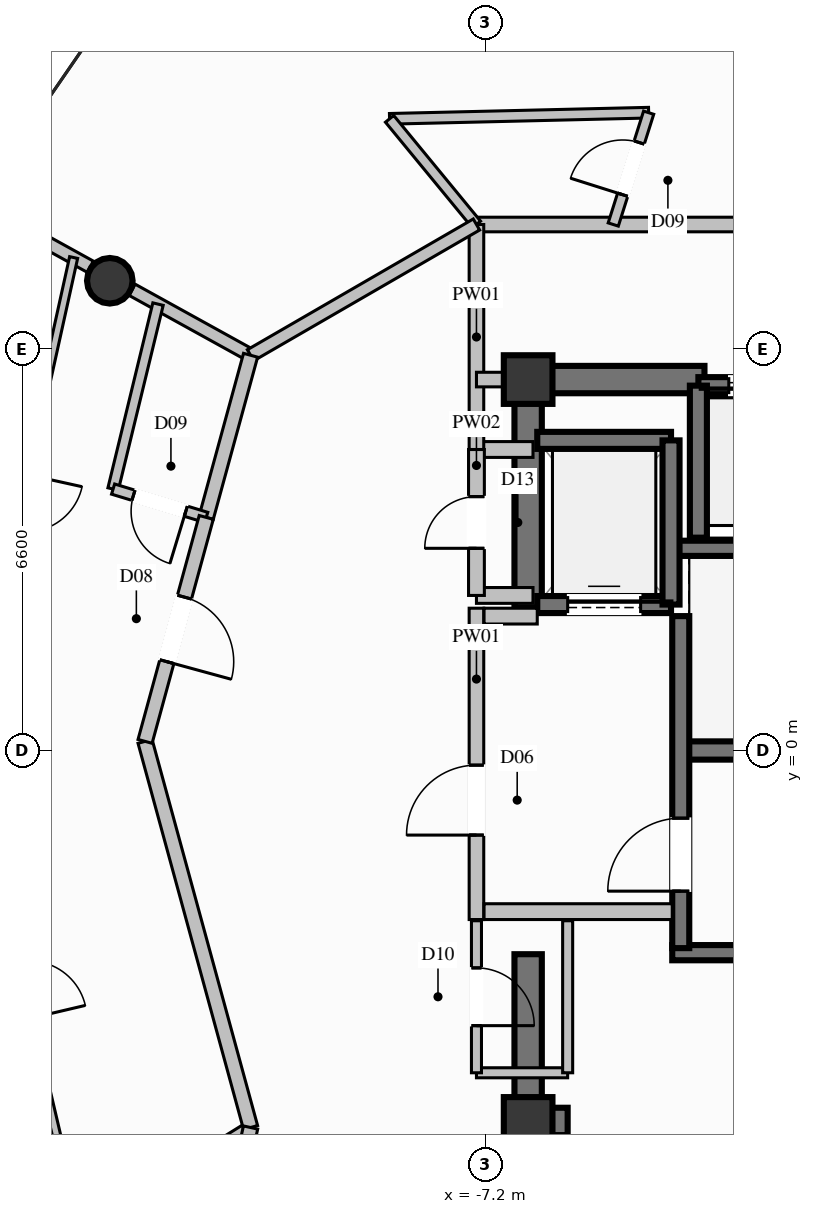
"""IFC4 building model, lengths in metres.
Left out: names, types, materials, properties, quantities, classifications, styles, units other than length and angle.
Written with IfcOpenShell. Run it as: python <this file> out.ifc"""

import sys

from ifc_helpers import new_model, si_unit, direction, frame, frame_2d, origin, origin_2d, place, context, subcontext, project, spatial, rectangle, circle, extrude, element, fill, save


model = new_model("IFC4")
c1 = context("Model", 3, precision=1e-05, world=origin(), true_north=direction((0.0, 1.0)))
c2 = subcontext(c1, "Body", "Model", "MODEL_VIEW")
j1 = project(units=[si_unit("LENGTHUNIT", "METRE"), si_unit("PLANEANGLEUNIT", "RADIAN")], contexts=[c1])
p1 = place(None, origin())
s1 = spatial("IfcSite", under=j1, at=p1, CompositionType="ELEMENT")
p2 = place(p1, origin())
s2 = spatial("IfcBuilding", under=s1, at=p2, CompositionType="ELEMENT")
p3 = place(p2, frame((0.0, 0.0, 250.6)))
s3 = spatial("IfcBuildingStorey", under=s2, at=p3, CompositionType="ELEMENT", Elevation=250.6)
for number, where, z_axis, x_axis in (
    (1, (-6.5, -6.1, 0.0), (0.0, 0.0, 1.0), (1.0, 0.0, 0.0)),
    (2, (-6.5, 6.1, 0.0), (0.0, 0.0, 1.0), (1.0, 0.0, 0.0)),
):
    element("IfcColumn", number, at=place(p3, frame(where, z_axis=z_axis, x_axis=x_axis)), inside=s3, PredefinedType="COLUMN", context=c2, shape_type="SweptSolid", body=[
        extrude(rectangle(XDim=0.8, YDim=0.8, at=origin_2d()), origin(), (0.0, 0.0, 1.0), 3.8),
    ])
p4 = place(p3, frame((-3.99, 0.0, 0.0), z_axis=(0.0, 0.0, 1.0), x_axis=(1.0, 0.0, 0.0)))
e3 = element("IfcWall", 3, at=p4, inside=s3, PredefinedType="SHEAR", context=c2, shape_type="SweptSolid", body=[
    extrude(rectangle(XDim=7.98, YDim=0.3, at=frame_2d((3.99, 0.0))), origin(), (0.0, 0.0, 1.0), 3.8),
])
for number, where, z_axis, x_axis in (
    (4, (-4.13, -3.325, 0.0), (0.0, 0.0, 1.0), (1.0, 0.0, 0.0)),
    (5, (-4.13, 3.325, 0.0), (0.0, 0.0, 1.0), (1.0, 0.0, 0.0)),
):
    element("IfcWall", number, at=place(p3, frame(where, z_axis=z_axis, x_axis=x_axis)), inside=s3, PredefinedType="SOLIDWALL", context=c2, shape_type="SweptSolid", body=[
        extrude(rectangle(XDim=8.26, YDim=0.25, at=frame_2d((4.13, 0.0))), origin(), (0.0, 0.0, 1.0), 3.8),
    ])
p5 = place(p3, frame((-6.275, -6.1, 0.0), z_axis=(0.0, 0.0, 1.0), x_axis=(1.0, 0.0, 0.0)))
e6 = element("IfcWall", 6, at=p5, inside=s3, PredefinedType="SHEAR", context=c2, shape_type="SweptSolid", body=[
    extrude(rectangle(XDim=0.425, YDim=0.45, at=frame_2d((0.212, 0.0))), origin(), (0.0, 0.0, 1.0), 3.8),
])
p6 = place(p3, frame((-6.275, 6.1, 0.0), z_axis=(0.0, 0.0, 1.0), x_axis=(1.0, 0.0, 0.0)))
e7 = element("IfcWall", 7, at=p6, inside=s3, PredefinedType="SHEAR", context=c2, shape_type="SweptSolid", body=[
    extrude(rectangle(XDim=2.675, YDim=0.45, at=frame_2d((1.337, 0.0))), origin(), (0.0, 0.0, 1.0), 3.8),
])
p7 = place(p3, frame((-6.5, 2.35, 0.0), z_axis=(0.0, 0.0, 1.0), x_axis=(0.0, 1.0, 0.0)))
e8 = element("IfcWall", 8, at=p7, inside=s3, PredefinedType="SHEAR", context=c2, shape_type="SweptSolid", body=[
    extrude(rectangle(XDim=3.975, YDim=0.45, at=frame_2d((1.987, 0.0))), origin(), (0.0, 0.0, 1.0), 3.8),
])
p8 = place(p3, frame((-6.5, -6.325, 0.0), z_axis=(0.0, 0.0, 1.0), x_axis=(0.0, 1.0, 0.0)))
e9 = element("IfcWall", 9, at=p8, inside=s3, PredefinedType="SHEAR", context=c2, shape_type="SweptSolid", body=[
    extrude(rectangle(XDim=2.975, YDim=0.45, at=frame_2d((1.487, 0.0))), origin(), (0.0, 0.0, 1.0), 3.8),
])
p9 = place(p3, frame((-13.38, 7.725, 0.0), z_axis=(0.0, 0.0, 1.0), x_axis=(1.0, 0.0, 0.0)))
e10 = element("IfcColumn", 10, at=p9, inside=s3, PredefinedType="COLUMN", context=c2, shape_type="SweptSolid", body=[
    extrude(circle(Radius=0.375, at=origin_2d()), origin(), (0.0, 0.0, 1.0), 3.8),
])
p10 = place(p3, frame((-1.6, 6.0, 0.0), z_axis=(0.0, 0.0, 1.0), x_axis=(-1.0, 0.0, 0.0)))
e11 = element("IfcWall", 11, at=p10, inside=s3, PredefinedType="SOLIDWALL", context=c2, shape_type="SweptSolid", body=[
    extrude(rectangle(XDim=2.1, YDim=0.28, at=frame_2d((1.05, 0.0))), origin(), (0.0, 0.0, 1.0), 3.57),
])
p11 = place(p10, frame((0.5, 0.0, 0.0)))
e12 = element("IfcOpeningElement", 12, at=p11, cuts=e11, PredefinedType="OPENING", context=c2, shape_type="SweptSolid", body=[
    extrude(rectangle(XDim=1.1, YDim=2.2, at=frame_2d((0.55, 1.1))), frame((0.0, 0.15, 0.0), z_axis=(0.0, -1.0, 0.0), x_axis=(1.0, 0.0, 0.0)), (0.0, 0.0, 1.0), 0.3),
])
p12 = place(p3, frame((-3.7, 6.0, 0.0), z_axis=(0.0, 0.0, 1.0), x_axis=(0.0, -1.0, 0.0)))
e13 = element("IfcWall", 13, at=p12, inside=s3, PredefinedType="SOLIDWALL", context=c2, shape_type="SweptSolid", body=[
    extrude(rectangle(XDim=2.5, YDim=0.28, at=frame_2d((1.25, 0.0))), origin(), (0.0, 0.0, 1.0), 3.57),
])
p13 = place(p3, frame((-6.35, 2.4, 0.0), z_axis=(0.0, 0.0, 1.0), x_axis=(1.0, 0.0, 0.0)))
e14 = element("IfcWall", 14, at=p13, inside=s3, PredefinedType="SOLIDWALL", context=c2, shape_type="SweptSolid", body=[
    extrude(rectangle(XDim=2.2, YDim=0.28, at=frame_2d((1.1, 0.0))), origin(), (0.0, 0.0, 1.0), 3.57),
])
p14 = place(p13, frame((0.5, 0.0, 0.0)))
e15 = element("IfcOpeningElement", 15, at=p14, cuts=e14, PredefinedType="OPENING", context=c2, shape_type="SweptSolid", body=[
    extrude(rectangle(XDim=1.2, YDim=2.2, at=frame_2d((0.6, 1.1))), frame((0.0, 0.15, 0.0), z_axis=(0.0, -1.0, 0.0), x_axis=(1.0, 0.0, 0.0)), (0.0, 0.0, 1.0), 0.3),
])
p15 = place(p3, frame((-4.15, 5.1, 0.0), z_axis=(0.0, 0.0, 1.0), x_axis=(-1.0, 0.0, 0.0)))
e16 = element("IfcWall", 16, at=p15, inside=s3, PredefinedType="SOLIDWALL", context=c2, shape_type="SweptSolid", body=[
    extrude(rectangle(XDim=2.2, YDim=0.28, at=frame_2d((1.1, 0.0))), origin(), (0.0, 0.0, 1.0), 3.57),
])
p16 = place(p3, frame((-4.15, 2.4, 0.0), z_axis=(0.0, 0.0, 1.0), x_axis=(0.0, 1.0, 0.0)))
e17 = element("IfcWall", 17, at=p16, inside=s3, PredefinedType="SOLIDWALL", context=c2, shape_type="SweptSolid", body=[
    extrude(rectangle(XDim=2.7, YDim=0.28, at=frame_2d((1.35, 0.0))), origin(), (0.0, 0.0, 1.0), 3.57),
])
p17 = place(p3, frame((-3.99, -3.25, 0.0), z_axis=(0.0, 0.0, 1.0), x_axis=(0.0, 1.0, 0.0)))
e18 = element("IfcWall", 18, at=p17, inside=s3, PredefinedType="SOLIDWALL", context=c2, shape_type="SweptSolid", body=[
    extrude(rectangle(XDim=5.46, YDim=0.28, at=frame_2d((2.73, 0.0))), origin(), (0.0, 0.0, 1.0), 3.57),
])
p18 = place(p17, frame((0.937, 0.0, 0.0)))
e19 = element("IfcOpeningElement", 19, at=p18, cuts=e18, PredefinedType="OPENING", context=c2, shape_type="SweptSolid", body=[
    extrude(rectangle(XDim=1.2, YDim=2.2, at=frame_2d((0.6, 1.1))), frame((0.0, 0.15, 0.0), z_axis=(0.0, -1.0, 0.0), x_axis=(1.0, 0.0, 0.0)), (0.0, 0.0, 1.0), 0.3),
])
p19 = place(p3, frame((-7.35, -2.78, 0.0), z_axis=(0.0, 0.0, 1.0), x_axis=(0.0, 1.0, 0.0)))
e20 = element("IfcWall", 20, at=p19, inside=s3, PredefinedType="PARTITIONING", context=c2, shape_type="SweptSolid", body=[
    extrude(rectangle(XDim=5.12, YDim=0.24, at=frame_2d((2.56, 0.0))), origin(), (0.0, 0.0, 1.0), 2.655),
])
p20 = place(p19, frame((1.389, 0.0, 0.0)))
e21 = element("IfcOpeningElement", 21, at=p20, cuts=e20, PredefinedType="OPENING", context=c2, shape_type="SweptSolid", body=[
    extrude(rectangle(XDim=1.15, YDim=2.2, at=frame_2d((0.575, 1.1))), frame((0.0, 0.13, 0.0), z_axis=(0.0, -1.0, 0.0), x_axis=(1.0, 0.0, 0.0)), (0.0, 0.0, 1.0), 0.26),
])
p21 = place(p3, frame((-7.225, -2.65, 0.0), z_axis=(0.0, 0.0, 1.0), x_axis=(1.0, 0.0, 0.0)))
e22 = element("IfcWall", 22, at=p21, inside=s3, PredefinedType="PARTITIONING", context=c2, shape_type="SweptSolid", body=[
    extrude(rectangle(XDim=3.095, YDim=0.26, at=frame_2d((1.548, 0.0))), origin(), (0.0, 0.0, 1.0), 3.57),
])
p22 = place(p3, frame((-7.225, 2.21, 0.0), z_axis=(0.0, 0.0, 1.0), x_axis=(1.0, 0.0, 0.0)))
e23 = element("IfcWall", 23, at=p22, inside=s3, PredefinedType="PARTITIONING", context=c2, shape_type="SweptSolid", body=[
    extrude(rectangle(XDim=0.875, YDim=0.26, at=frame_2d((0.438, 0.0))), origin(), (0.0, 0.0, 1.0), 3.57),
])
for number, where, z_axis, x_axis in (
    (24, (-7.35, 4.95, 0.0), (0.0, 0.0, 1.0), (1.0, 0.0, 0.0)),
    (25, (-7.35, 2.55, 0.0), (0.0, 0.0, 1.0), (1.0, 0.0, 0.0)),
):
    element("IfcWall", number, at=place(p3, frame(where, z_axis=z_axis, x_axis=x_axis)), inside=s3, PredefinedType="PARTITIONING", context=c2, shape_type="SweptSolid", body=[
        extrude(rectangle(XDim=0.93, YDim=0.26, at=frame_2d((0.465, 0.0))), origin(), (0.0, 0.0, 1.0), 3.57),
    ])
p23 = place(p3, frame((-7.35, 2.55, 0.0), z_axis=(0.0, 0.0, 1.0), x_axis=(0.0, 1.0, 0.0)))
e26 = element("IfcWall", 26, at=p23, inside=s3, PredefinedType="PARTITIONING", context=c2, shape_type="SweptSolid", body=[
    extrude(rectangle(XDim=2.4, YDim=0.26, at=frame_2d((1.2, 0.0))), origin(), (0.0, 0.0, 1.0), 2.655),
])
p24 = place(p23, frame((0.775, 0.0, 0.0)))
e27 = element("IfcOpeningElement", 27, at=p24, cuts=e26, PredefinedType="OPENING", context=c2, shape_type="SweptSolid", body=[
    extrude(rectangle(XDim=0.85, YDim=2.05, at=frame_2d((0.425, 1.025))), frame((0.0, 0.14, 0.0), z_axis=(0.0, -1.0, 0.0), x_axis=(1.0, 0.0, 0.0)), (0.0, 0.0, 1.0), 0.28),
])
p25 = place(p3, frame((-7.35, 8.65, 0.0), z_axis=(0.0, 0.0, 1.0), x_axis=(1.0, 0.0, 0.0)))
e28 = element("IfcWall", 28, at=p25, inside=s3, PredefinedType="PARTITIONING", context=c2, shape_type="SweptSolid", body=[
    extrude(rectangle(XDim=14.7, YDim=0.24, at=frame_2d((7.35, 0.0))), origin(), (0.0, 0.0, 1.0), 3.57),
])
p26 = place(p3, frame((-7.35, 4.95, 0.0), z_axis=(0.0, 0.0, 1.0), x_axis=(0.0, 1.0, 0.0)))
e29 = element("IfcWall", 29, at=p26, inside=s3, PredefinedType="PARTITIONING", context=c2, shape_type="SweptSolid", body=[
    extrude(rectangle(XDim=3.7, YDim=0.24, at=frame_2d((1.85, 0.0))), origin(), (0.0, 0.0, 1.0), 2.655),
])
p27 = place(p3, frame((-7.35, 6.1, 0.0), z_axis=(0.0, 0.0, 1.0), x_axis=(1.0, 0.0, 0.0)))
e30 = element("IfcWall", 30, at=p27, inside=s3, PredefinedType="PARTITIONING", context=c2, shape_type="SweptSolid", body=[
    extrude(rectangle(XDim=0.85, YDim=0.24, at=frame_2d((0.425, 0.0))), origin(), (0.0, 0.0, 1.0), 3.086),
])
p28 = place(p3, frame((-7.35, -5.3, 0.0), z_axis=(0.0, 0.0, 1.0), x_axis=(1.0, 0.0, 0.0)))
e31 = element("IfcWall", 31, at=p28, inside=s3, PredefinedType="PARTITIONING", context=c2, shape_type="SweptSolid", body=[
    extrude(rectangle(XDim=1.5, YDim=0.165, at=frame_2d((0.75, 0.0))), origin(), (0.0, 0.0, 1.0), 2.655),
])
p29 = place(p3, frame((-5.85, -5.3, 0.0), z_axis=(0.0, 0.0, 1.0), x_axis=(0.0, 1.0, 0.0)))
e32 = element("IfcWall", 32, at=p29, inside=s3, PredefinedType="PARTITIONING", context=c2, shape_type="SweptSolid", body=[
    extrude(rectangle(XDim=2.5, YDim=0.165, at=frame_2d((1.25, 0.0))), origin(), (0.0, 0.0, 1.0), 2.655),
])
p30 = place(p3, frame((-7.35, -2.8, 0.0), z_axis=(0.0, 0.0, 1.0), x_axis=(0.0, -1.0, 0.0)))
e33 = element("IfcWall", 33, at=p30, inside=s3, PredefinedType="PARTITIONING", context=c2, shape_type="SweptSolid", body=[
    extrude(rectangle(XDim=2.5, YDim=0.165, at=frame_2d((1.25, 0.0))), origin(), (0.0, 0.0, 1.0), 3.57),
])
p31 = place(p30, frame((0.775, 0.0, 0.0)))
e34 = element("IfcOpeningElement", 34, at=p31, cuts=e33, PredefinedType="OPENING", context=c2, shape_type="SweptSolid", body=[
    extrude(rectangle(XDim=0.95, YDim=2.1, at=frame_2d((0.475, 1.05))), frame((0.0, 0.093, 0.0), z_axis=(0.0, -1.0, 0.0), x_axis=(1.0, 0.0, 0.0)), (0.0, 0.0, 1.0), 0.185),
])
p32 = place(p3, frame((-11.065, 6.5, 0.0), z_axis=(0.0, 0.0, 1.0), x_axis=(-0.875272070591, 0.483630853486, 0.0)))
e35 = element("IfcWall", 35, at=p32, inside=s3, PredefinedType="PARTITIONING", context=c2, shape_type="SweptSolid", body=[
    extrude(rectangle(XDim=2.227, YDim=0.21, at=frame_2d((1.113, 0.0))), origin(), (0.0, 0.0, 1.0), 3.086),
])
p33 = place(p3, frame((-13.701, 7.956, 0.0), z_axis=(0.0, 0.0, 1.0), x_axis=(-0.875359190626, 0.483473150637, 0.0)))
e36 = element("IfcWall", 36, at=p33, inside=s3, PredefinedType="PARTITIONING", context=c2, shape_type="SweptSolid", body=[
    extrude(rectangle(XDim=2.103, YDim=0.21, at=frame_2d((1.052, 0.0))), origin(), (0.0, 0.0, 1.0), 3.57),
])
p34 = place(p3, frame((-11.065, -6.2, 0.0), z_axis=(0.0, 0.0, 1.0), x_axis=(-0.84962275773, -0.527390907722, 0.0)))
e37 = element("IfcWall", 37, at=p34, inside=s3, PredefinedType="PARTITIONING", context=c2, shape_type="SweptSolid", body=[
    extrude(rectangle(XDim=2.384, YDim=0.21, at=frame_2d((1.192, 0.0))), origin(), (0.0, 0.0, 1.0), 3.086),
])
p35 = place(p3, frame((-8.779, 10.388, 0.0), z_axis=(0.0, 0.0, 1.0), x_axis=(0.999718779303, 0.02371417949, 0.0)))
e38 = element("IfcWall", 38, at=p35, inside=s3, PredefinedType="PLUMBINGWALL", context=c2, shape_type="SweptSolid", body=[
    extrude(rectangle(XDim=4.262, YDim=0.175, at=frame_2d((2.131, 0.0))), origin(), (0.0, 0.0, 1.0), 3.252),
])
p36 = place(p3, frame((-8.779, 10.388, 0.0), z_axis=(0.0, 0.0, 1.0), x_axis=(0.635079503828, -0.772446777337, 0.0)))
e39 = element("IfcWall", 39, at=p36, inside=s3, PredefinedType="PLUMBINGWALL", context=c2, shape_type="SweptSolid", body=[
    extrude(rectangle(XDim=2.25, YDim=0.175, at=frame_2d((1.125, 0.0))), origin(), (0.0, 0.0, 1.0), 3.57),
])
p37 = place(p3, frame((-5.1, 8.65, 0.0), z_axis=(0.0, 0.0, 1.0), x_axis=(0.301724909856, 0.953395027663, 0.0)))
e40 = element("IfcWall", 40, at=p37, inside=s3, PredefinedType="PLUMBINGWALL", context=c2, shape_type="SweptSolid", body=[
    extrude(rectangle(XDim=1.929, YDim=0.175, at=frame_2d((0.964, 0.0))), origin(), (0.0, 0.0, 1.0), 3.57),
])
p38 = place(p37, frame((0.514, 0.0, 0.0)))
e41 = element("IfcOpeningElement", 41, at=p38, cuts=e40, PredefinedType="OPENING", context=c2, shape_type="SweptSolid", body=[
    extrude(rectangle(XDim=0.9, YDim=2.1, at=frame_2d((0.45, 1.05))), frame((0.0, 0.098, 0.0), z_axis=(0.0, -1.0, 0.0), x_axis=(1.0, 0.0, 0.0)), (0.0, 0.0, 1.0), 0.195),
])
p39 = place(p3, frame((-11.065, 6.5, 0.0), z_axis=(0.0, 0.0, 1.0), x_axis=(0.865506757898, 0.50089724698, 0.0)))
e42 = element("IfcWall", 42, at=p39, inside=s3, PredefinedType="PARTITIONING", context=c2, shape_type="SweptSolid", body=[
    extrude(rectangle(XDim=4.292, YDim=0.21, at=frame_2d((2.146, 0.0))), origin(), (0.0, 0.0, 1.0), 3.57),
])
p40 = place(p3, frame((-11.065, 6.5, 0.0), z_axis=(0.0, 0.0, 1.0), x_axis=(-0.263670269996, -0.964612869871, 0.0)))
e43 = element("IfcWall", 43, at=p40, inside=s3, PredefinedType="PARTITIONING", context=c2, shape_type="SweptSolid", body=[
    extrude(rectangle(XDim=2.765, YDim=0.24, at=frame_2d((1.382, 0.0))), origin(), (0.0, 0.0, 1.0), 3.57),
])
p41 = place(p3, frame((-12.587, 7.341, 0.0), z_axis=(0.0, 0.0, 1.0), x_axis=(-0.236070972306, -0.971735815968, 0.0)))
e44 = element("IfcWall", 44, at=p41, inside=s3, PredefinedType="PLUMBINGWALL", context=c2, shape_type="SweptSolid", body=[
    extrude(rectangle(XDim=3.13, YDim=0.175, at=frame_2d((1.565, 0.0))), origin(), (0.0, 0.0, 1.0), 3.57),
])
p42 = place(p3, frame((-11.794, 3.833, 0.0), z_axis=(0.0, 0.0, 1.0), x_axis=(-0.956707110137, 0.29105241008, 0.0)))
e45 = element("IfcWall", 45, at=p42, inside=s3, PredefinedType="PLUMBINGWALL", context=c2, shape_type="SweptSolid", body=[
    extrude(rectangle(XDim=1.601, YDim=0.175, at=frame_2d((0.801, 0.0))), origin(), (0.0, 0.0, 1.0), 3.57),
])
p43 = place(p42, frame((0.351, 0.0, 0.0)))
e46 = element("IfcOpeningElement", 46, at=p43, cuts=e45, PredefinedType="OPENING", context=c2, shape_type="SweptSolid", body=[
    extrude(rectangle(XDim=0.9, YDim=2.1, at=frame_2d((0.45, 1.05))), frame((0.0, 0.098, 0.0), z_axis=(0.0, -1.0, 0.0), x_axis=(1.0, 0.0, 0.0)), (0.0, 0.0, 1.0), 0.195),
])
p44 = place(p3, frame((-12.8, 0.15, 0.0), z_axis=(0.0, 0.0, 1.0), x_axis=(0.263588113382, -0.964635323054, 0.0)))
e47 = element("IfcWall", 47, at=p44, inside=s3, PredefinedType="PARTITIONING", context=c2, shape_type="SweptSolid", body=[
    extrude(rectangle(XDim=6.583, YDim=0.24, at=frame_2d((3.292, 0.0))), origin(), (0.0, 0.0, 1.0), 3.57),
])
p45 = place(p3, frame((-11.794, 3.833, 0.0), z_axis=(0.0, 0.0, 1.0), x_axis=(-0.263512359615, -0.964656019693, 0.0)))
e48 = element("IfcWall", 48, at=p45, inside=s3, PredefinedType="PARTITIONING", context=c2, shape_type="SweptSolid", body=[
    extrude(rectangle(XDim=3.818, YDim=0.24, at=frame_2d((1.909, 0.0))), origin(), (0.0, 0.0, 1.0), 3.57),
])
p46 = place(p45, frame((1.359, 0.0, 0.0)))
e49 = element("IfcOpeningElement", 49, at=p46, cuts=e48, PredefinedType="OPENING", context=c2, shape_type="SweptSolid", body=[
    extrude(rectangle(XDim=1.1, YDim=2.3, at=frame_2d((0.55, 1.15))), frame((0.0, 0.13, 0.0), z_axis=(0.0, -1.0, 0.0), x_axis=(1.0, 0.0, 0.0)), (0.0, 0.0, 1.0), 0.26),
])
p47 = place(p3, frame((-13.975, 8.107, 0.0), z_axis=(0.0, 0.0, 1.0), x_axis=(-0.215893129174, -0.97641699943, 0.0)))
e50 = element("IfcWall", 50, at=p47, inside=s3, PredefinedType="PARTITIONING", context=c2, shape_type="SweptSolid", body=[
    extrude(rectangle(XDim=8.25, YDim=0.135, at=frame_2d((4.125, 0.0))), origin(), (0.0, 0.0, 1.0), 3.139),
])
p48 = place(p47, frame((3.65, 0.0, 0.0)))
e51 = element("IfcOpeningElement", 51, at=p48, cuts=e50, PredefinedType="OPENING", context=c2, shape_type="SweptSolid", body=[
    extrude(rectangle(XDim=0.95, YDim=2.1, at=frame_2d((0.475, 1.05))), frame((0.0, 0.078, 0.0), z_axis=(0.0, -1.0, 0.0), x_axis=(1.0, 0.0, 0.0)), (0.0, 0.0, 1.0), 0.155),
])
p49 = place(p3, frame((-15.756, 0.052, 0.0), z_axis=(0.0, 0.0, 1.0), x_axis=(0.228862090804, -0.973458855521, 0.0)))
e52 = element("IfcWall", 52, at=p49, inside=s3, PredefinedType="PARTITIONING", context=c2, shape_type="SweptSolid", body=[
    extrude(rectangle(XDim=8.215, YDim=0.135, at=frame_2d((4.107, 0.0))), origin(), (0.0, 0.0, 1.0), 3.139),
])
p50 = place(p49, frame((3.633, 0.0, 0.0)))
e53 = element("IfcOpeningElement", 53, at=p50, cuts=e52, PredefinedType="OPENING", context=c2, shape_type="SweptSolid", body=[
    extrude(rectangle(XDim=0.95, YDim=2.1, at=frame_2d((0.475, 1.05))), frame((0.0, 0.078, 0.0), z_axis=(0.0, -1.0, 0.0), x_axis=(1.0, 0.0, 0.0)), (0.0, 0.0, 1.0), 0.155),
])
p51 = place(p3, frame((-11.065, -6.2, 0.0), z_axis=(0.0, 0.0, 1.0), x_axis=(-0.215375028734, -0.976531411168, 0.0)))
e54 = element("IfcWall", 54, at=p51, inside=s3, PredefinedType="PARTITIONING", context=c2, shape_type="SweptSolid", body=[
    extrude(rectangle(XDim=5.735, YDim=0.24, at=frame_2d((2.867, 0.0))), origin(), (0.0, 0.0, 1.0), 3.57),
])
p52 = place(p11, origin())
e55 = element("IfcDoor", 55, at=p52, inside=s3, OperationType="SLIDING_TO_LEFT", PredefinedType="DOOR", context=c2, shape_type="SweptSolid", body=[
    extrude(rectangle(XDim=1.1, YDim=2.2, at=frame_2d((0.55, 1.1))), frame((0.0, 0.025, 0.0), z_axis=(0.0, -1.0, 0.0), x_axis=(1.0, 0.0, 0.0)), (0.0, 0.0, 1.0), 0.05),
])
fill(e12, e55)
p53 = place(p14, origin())
e56 = element("IfcDoor", 56, at=p53, inside=s3, OperationType="SLIDING_TO_LEFT", PredefinedType="DOOR", context=c2, shape_type="SweptSolid", body=[
    extrude(rectangle(XDim=1.2, YDim=2.2, at=frame_2d((0.6, 1.1))), frame((0.0, 0.025, 0.0), z_axis=(0.0, -1.0, 0.0), x_axis=(1.0, 0.0, 0.0)), (0.0, 0.0, 1.0), 0.05),
])
fill(e15, e56)
p54 = place(p18, origin())
e57 = element("IfcDoor", 57, at=p54, inside=s3, OperationType="SINGLE_SWING_LEFT", PredefinedType="DOOR", context=c2, shape_type="SweptSolid", body=[
    extrude(rectangle(XDim=1.2, YDim=2.2, at=frame_2d((0.6, 1.1))), frame((0.0, 0.025, 0.0), z_axis=(0.0, -1.0, 0.0), x_axis=(1.0, 0.0, 0.0)), (0.0, 0.0, 1.0), 0.05),
])
fill(e19, e57)
p55 = place(p20, origin())
e58 = element("IfcDoor", 58, at=p55, inside=s3, OperationType="SINGLE_SWING_LEFT", PredefinedType="DOOR", context=c2, shape_type="SweptSolid", body=[
    extrude(rectangle(XDim=1.15, YDim=2.2, at=frame_2d((0.575, 1.1))), frame((0.0, 0.025, 0.0), z_axis=(0.0, -1.0, 0.0), x_axis=(1.0, 0.0, 0.0)), (0.0, 0.0, 1.0), 0.05),
])
fill(e21, e58)
p56 = place(p24, origin())
e59 = element("IfcDoor", 59, at=p56, inside=s3, OperationType="SINGLE_SWING_LEFT", PredefinedType="DOOR", context=c2, shape_type="SweptSolid", body=[
    extrude(rectangle(XDim=0.85, YDim=2.05, at=frame_2d((0.425, 1.025))), frame((0.0, 0.025, 0.0), z_axis=(0.0, -1.0, 0.0), x_axis=(1.0, 0.0, 0.0)), (0.0, 0.0, 1.0), 0.05),
])
fill(e27, e59)
p57 = place(p31, origin())
e60 = element("IfcDoor", 60, at=p57, inside=s3, OperationType="SINGLE_SWING_RIGHT", PredefinedType="DOOR", context=c2, shape_type="SweptSolid", body=[
    extrude(rectangle(XDim=0.95, YDim=2.1, at=frame_2d((0.475, 1.05))), frame((0.0, 0.025, 0.0), z_axis=(0.0, -1.0, 0.0), x_axis=(1.0, 0.0, 0.0)), (0.0, 0.0, 1.0), 0.05),
])
fill(e34, e60)
p58 = place(p38, origin())
e61 = element("IfcDoor", 61, at=p58, inside=s3, OperationType="SINGLE_SWING_LEFT", PredefinedType="DOOR", context=c2, shape_type="SweptSolid", body=[
    extrude(rectangle(XDim=0.9, YDim=2.1, at=frame_2d((0.45, 1.05))), frame((0.0, 0.025, 0.0), z_axis=(0.0, -1.0, 0.0), x_axis=(1.0, 0.0, 0.0)), (0.0, 0.0, 1.0), 0.05),
])
fill(e41, e61)
p59 = place(p43, origin())
e62 = element("IfcDoor", 62, at=p59, inside=s3, OperationType="SINGLE_SWING_LEFT", PredefinedType="DOOR", context=c2, shape_type="SweptSolid", body=[
    extrude(rectangle(XDim=0.9, YDim=2.1, at=frame_2d((0.45, 1.05))), frame((0.0, 0.025, 0.0), z_axis=(0.0, -1.0, 0.0), x_axis=(1.0, 0.0, 0.0)), (0.0, 0.0, 1.0), 0.05),
])
fill(e46, e62)
p60 = place(p46, origin())
e63 = element("IfcDoor", 63, at=p60, inside=s3, OperationType="SINGLE_SWING_RIGHT", PredefinedType="DOOR", context=c2, shape_type="SweptSolid", body=[
    extrude(rectangle(XDim=1.1, YDim=2.3, at=frame_2d((0.55, 1.15))), frame((0.0, 0.025, 0.0), z_axis=(0.0, -1.0, 0.0), x_axis=(1.0, 0.0, 0.0)), (0.0, 0.0, 1.0), 0.05),
])
fill(e49, e63)
save(model, sys.argv[1])
